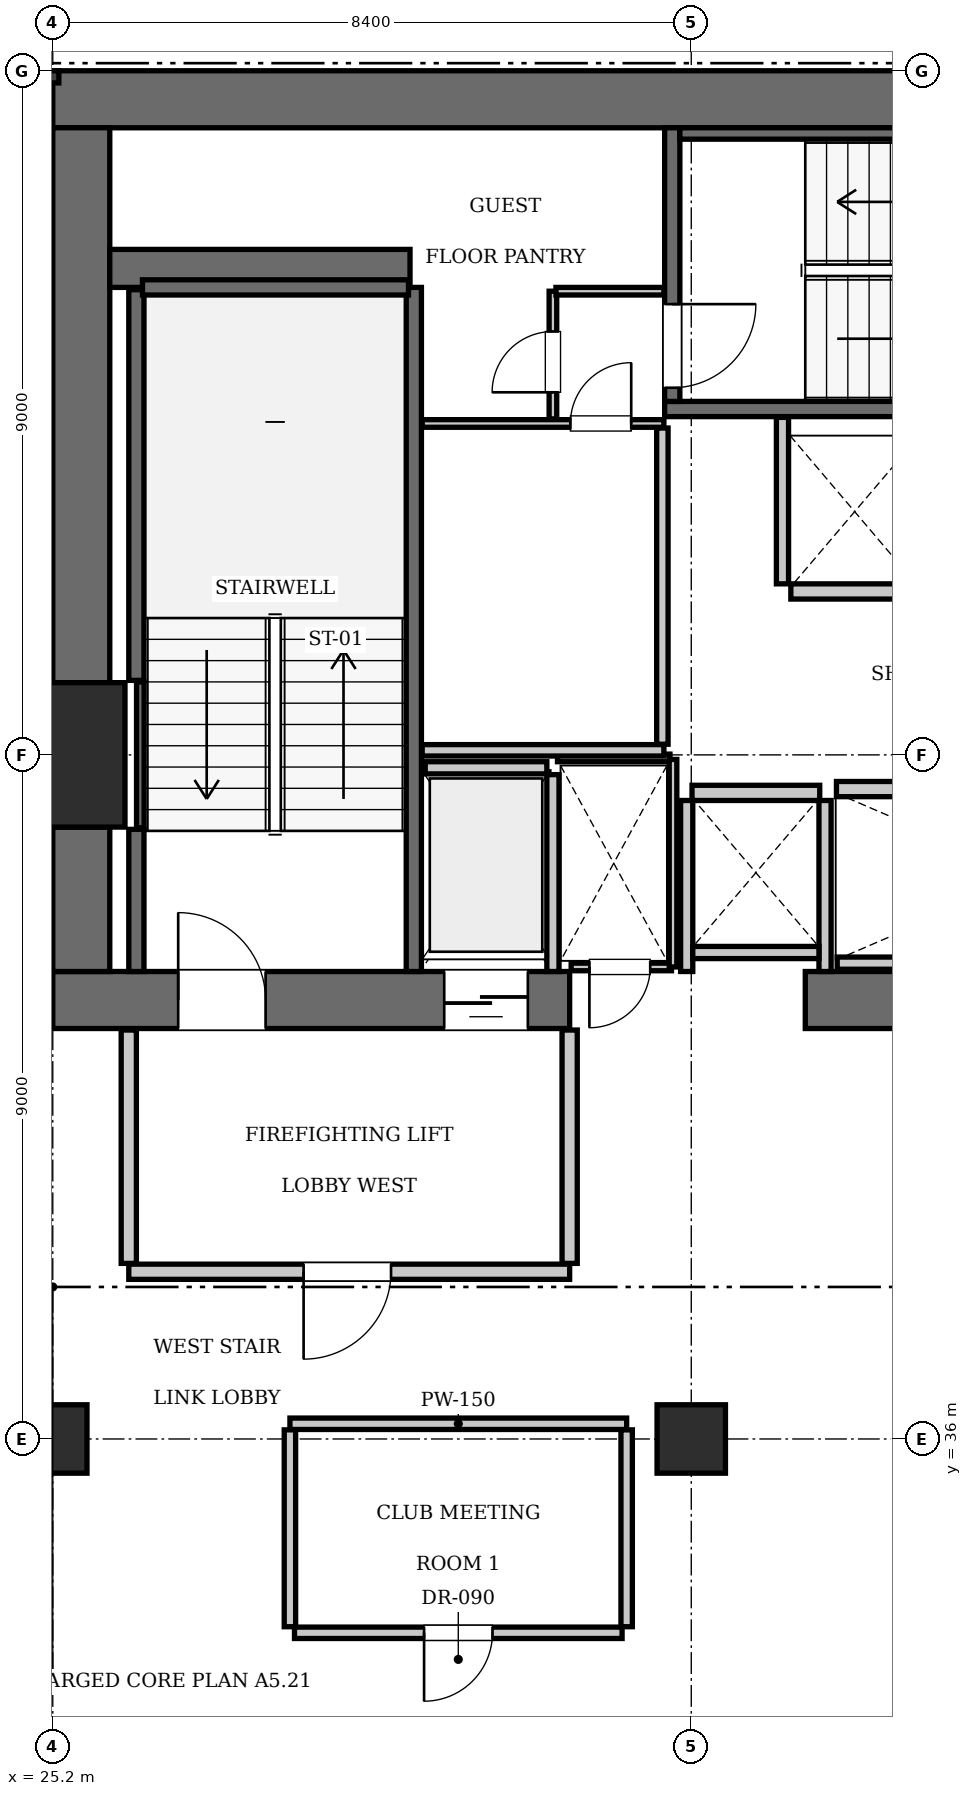
"""IFC4 building model, lengths in metres.
Left out: names, types, materials, properties, quantities, classifications, styles, units other than length and angle.
Written with IfcOpenShell. Run it as: python <this file> out.ifc"""

import sys

from ifc_helpers import new_model, si_unit, direction, frame, frame_2d, origin, origin_2d, place, context, subcontext, project, spatial, rectangle, extrude, element, fill, save


model = new_model("IFC4")
c1 = context("Model", 3, precision=1e-05, world=origin(), true_north=direction((0.0, 1.0)))
c2 = subcontext(c1, "Body", "Model", "MODEL_VIEW")
j1 = project(units=[si_unit("LENGTHUNIT", "METRE"), si_unit("PLANEANGLEUNIT", "RADIAN")], contexts=[c1])
p1 = place(None, origin())
s1 = spatial("IfcSite", under=j1, at=p1, CompositionType="ELEMENT")
p2 = place(p1, origin())
s2 = spatial("IfcBuilding", under=s1, at=p2, CompositionType="ELEMENT")
p3 = place(p2, frame((0.0, 0.0, 142.8)))
s3 = spatial("IfcBuildingStorey", under=s2, at=p3, CompositionType="ELEMENT", Elevation=142.8)
p4 = place(p3, frame((25.2, 45.0, 0.0), z_axis=(0.0, 0.0, 1.0), x_axis=(1.0, 0.0, 0.0)))
e1 = element("IfcColumn", 1, at=p4, inside=s3, PredefinedType="COLUMN", context=c2, shape_type="SweptSolid", body=[
    extrude(rectangle(XDim=1.9, YDim=1.9, at=origin_2d()), origin(), (0.0, 0.0, 1.0), 3.85),
])
p5 = place(p3, frame((25.2, 53.625, 0.0), z_axis=(0.0, 0.0, 1.0), x_axis=(1.0, 0.0, 0.0)))
e2 = element("IfcWall", 2, at=p5, inside=s3, PredefinedType="SHEAR", context=c2, shape_type="SweptSolid", body=[
    extrude(rectangle(XDim=25.2, YDim=0.75, at=frame_2d((12.6, 0.0))), origin(), (0.0, 0.0, 1.0), 3.85),
])
p6 = place(p3, frame((25.2, 41.775, 0.0), z_axis=(0.0, 0.0, 1.0), x_axis=(1.0, 0.0, 0.0)))
e3 = element("IfcWall", 3, at=p6, inside=s3, PredefinedType="SHEAR", context=c2, shape_type="SweptSolid", body=[
    extrude(rectangle(XDim=6.8, YDim=0.75, at=frame_2d((3.4, 0.0))), origin(), (0.0, 0.0, 1.0), 3.85),
])
p7 = place(p6, frame((1.65, 0.0, 0.0)))
e4 = element("IfcOpeningElement", 4, at=p7, cuts=e3, PredefinedType="OPENING", context=c2, shape_type="SweptSolid", body=[
    extrude(rectangle(XDim=1.15, YDim=2.15, at=frame_2d((0.575, 1.075))), frame((0.0, 0.385, 0.0), z_axis=(0.0, -1.0, 0.0), x_axis=(1.0, 0.0, 0.0)), (0.0, 0.0, 1.0), 0.77),
])
p8 = place(p6, frame((5.15, 0.0, 0.0)))
e5 = element("IfcOpeningElement", 5, at=p8, cuts=e3, PredefinedType="OPENING", context=c2, shape_type="SweptSolid", body=[
    extrude(rectangle(XDim=1.1, YDim=2.2, at=frame_2d((0.55, 1.1))), frame((0.0, 0.385, 0.0), z_axis=(0.0, -1.0, 0.0), x_axis=(1.0, 0.0, 0.0)), (0.0, 0.0, 1.0), 0.77),
])
p9 = place(p3, frame((35.1, 41.775, 0.0), z_axis=(0.0, 0.0, 1.0), x_axis=(1.0, 0.0, 0.0)))
e6 = element("IfcWall", 6, at=p9, inside=s3, PredefinedType="SHEAR", context=c2, shape_type="SweptSolid", body=[
    extrude(rectangle(XDim=5.4, YDim=0.75, at=frame_2d((2.7, 0.0))), origin(), (0.0, 0.0, 1.0), 3.85),
])
p10 = place(p3, frame((25.575, 42.15, 0.0), z_axis=(0.0, 0.0, 1.0), x_axis=(0.0, 1.0, 0.0)))
e7 = element("IfcWall", 7, at=p10, inside=s3, PredefinedType="SHEAR", context=c2, shape_type="SweptSolid", body=[
    extrude(rectangle(XDim=1.9, YDim=0.75, at=frame_2d((0.95, 0.0))), origin(), (0.0, 0.0, 1.0), 3.85),
])
p11 = place(p3, frame((25.575, 45.95, 0.0), z_axis=(0.0, 0.0, 1.0), x_axis=(0.0, 1.0, 0.0)))
e8 = element("IfcWall", 8, at=p11, inside=s3, PredefinedType="SHEAR", context=c2, shape_type="SweptSolid", body=[
    extrude(rectangle(XDim=7.3, YDim=0.75, at=frame_2d((3.65, 0.0))), origin(), (0.0, 0.0, 1.0), 3.85),
])
p12 = place(p3, frame((25.95, 51.4, 0.0), z_axis=(0.0, 0.0, 1.0), x_axis=(1.0, 0.0, 0.0)))
e9 = element("IfcWall", 9, at=p12, inside=s3, PredefinedType="SHEAR", context=c2, shape_type="SweptSolid", body=[
    extrude(rectangle(XDim=3.95, YDim=0.5, at=frame_2d((1.975, 0.0))), origin(), (0.0, 0.0, 1.0), 3.85),
])
for number, where, z_axis, x_axis in (
    (10, (25.2, 36.0, 0.0), (0.0, 0.0, 1.0), (1.0, 0.0, 0.0)),
    (11, (33.6, 36.0, 0.0), (0.0, 0.0, 1.0), (1.0, 0.0, 0.0)),
):
    element("IfcColumn", number, at=place(p3, frame(where, z_axis=z_axis, x_axis=x_axis)), inside=s3, PredefinedType="COLUMN", context=c2, shape_type="SweptSolid", body=[
        extrude(rectangle(XDim=0.9, YDim=0.9, at=origin_2d()), origin(), (0.0, 0.0, 1.0), 3.85),
    ])
p13 = place(p3, frame((29.95, 42.15, 0.0), z_axis=(0.0, 0.0, 1.0), x_axis=(0.0, 1.0, 0.0)))
e12 = element("IfcWall", 12, at=p13, inside=s3, PredefinedType="SOLIDWALL", context=c2, shape_type="SweptSolid", body=[
    extrude(rectangle(XDim=9.0, YDim=0.2, at=frame_2d((4.5, 0.0))), origin(), (0.0, 0.0, 1.0), 3.61),
])
p14 = place(p3, frame((26.3, 42.15, 0.0), z_axis=(0.0, 0.0, 1.0), x_axis=(0.0, 1.0, 0.0)))
e13 = element("IfcWall", 13, at=p14, inside=s3, PredefinedType="SOLIDWALL", context=c2, shape_type="SweptSolid", body=[
    extrude(rectangle(XDim=1.87, YDim=0.2, at=frame_2d((0.935, 0.0))), origin(), (0.0, 0.0, 1.0), 3.61),
])
p15 = place(p3, frame((26.3, 45.98, 0.0), z_axis=(0.0, 0.0, 1.0), x_axis=(0.0, 1.0, 0.0)))
e14 = element("IfcWall", 14, at=p15, inside=s3, PredefinedType="SOLIDWALL", context=c2, shape_type="SweptSolid", body=[
    extrude(rectangle(XDim=5.14, YDim=0.2, at=frame_2d((2.57, 0.0))), origin(), (0.0, 0.0, 1.0), 3.61),
])
p16 = place(p3, frame((26.38, 51.15, 0.0), z_axis=(0.0, 0.0, 1.0), x_axis=(1.0, 0.0, 0.0)))
e15 = element("IfcWall", 15, at=p16, inside=s3, PredefinedType="SOLIDWALL", context=c2, shape_type="SweptSolid", body=[
    extrude(rectangle(XDim=3.5, YDim=0.2, at=frame_2d((1.75, 0.0))), origin(), (0.0, 0.0, 1.0), 3.61),
])
p17 = place(p3, frame((26.352, 44.04, 0.0), z_axis=(0.0, 0.0, 1.0), x_axis=(0.0, 1.0, 0.0)))
e16 = element("IfcWall", 16, at=p17, inside=s3, PredefinedType="SOLIDWALL", context=c2, shape_type="SweptSolid", body=[
    extrude(rectangle(XDim=1.92, YDim=0.1, at=frame_2d((0.96, 0.0))), origin(), (0.0, 0.0, 1.0), 3.61),
])
p18 = place(p3, frame((33.25, 49.55, 0.0), z_axis=(0.0, 0.0, 1.0), x_axis=(1.0, 0.0, 0.0)))
e17 = element("IfcWall", 17, at=p18, inside=s3, PredefinedType="SOLIDWALL", context=c2, shape_type="SweptSolid", body=[
    extrude(rectangle(XDim=9.1, YDim=0.2, at=frame_2d((4.55, 0.0))), origin(), (0.0, 0.0, 1.0), 3.61),
])
p19 = place(p3, frame((33.35, 49.65, 0.0), z_axis=(0.0, 0.0, 1.0), x_axis=(0.0, 1.0, 0.0)))
e18 = element("IfcWall", 18, at=p19, inside=s3, PredefinedType="SOLIDWALL", context=c2, shape_type="SweptSolid", body=[
    extrude(rectangle(XDim=3.6, YDim=0.2, at=frame_2d((1.8, 0.0))), origin(), (0.0, 0.0, 1.0), 3.61),
])
p20 = place(p19, frame((0.18, 0.0, 0.0)))
e19 = element("IfcOpeningElement", 19, at=p20, cuts=e18, PredefinedType="OPENING", context=c2, shape_type="SweptSolid", body=[
    extrude(rectangle(XDim=1.1, YDim=2.15, at=frame_2d((0.55, 1.075))), frame((0.0, 0.11, 0.0), z_axis=(0.0, -1.0, 0.0), x_axis=(1.0, 0.0, 0.0)), (0.0, 0.0, 1.0), 0.22),
])
p21 = place(p3, frame((33.45, 53.175, 0.0), z_axis=(0.0, 0.0, 1.0), x_axis=(1.0, 0.0, 0.0)))
e20 = element("IfcWall", 20, at=p21, inside=s3, PredefinedType="SOLIDWALL", context=c2, shape_type="SweptSolid", body=[
    extrude(rectangle(XDim=8.7, YDim=0.15, at=frame_2d((4.35, 0.0))), origin(), (0.0, 0.0, 1.0), 3.61),
])
p22 = place(p3, frame((35.51, 44.55, 0.0), z_axis=(0.0, 0.0, 1.0), x_axis=(1.0, 0.0, 0.0)))
e21 = element("IfcWall", 21, at=p22, inside=s3, PredefinedType="SOLIDWALL", context=c2, shape_type="SweptSolid", body=[
    extrude(rectangle(XDim=1.68, YDim=0.2, at=frame_2d((0.84, 0.0))), origin(), (0.0, 0.0, 1.0), 3.61),
])
p23 = place(p3, frame((34.91, 47.15, 0.0), z_axis=(0.0, 0.0, 1.0), x_axis=(1.0, 0.0, 0.0)))
e22 = element("IfcWall", 22, at=p23, inside=s3, PredefinedType="SOLIDWALL", context=c2, shape_type="SweptSolid", body=[
    extrude(rectangle(XDim=1.68, YDim=0.2, at=frame_2d((0.84, 0.0))), origin(), (0.0, 0.0, 1.0), 3.61),
])
p24 = place(p3, frame((33.61, 44.5, 0.0), z_axis=(0.0, 0.0, 1.0), x_axis=(1.0, 0.0, 0.0)))
e23 = element("IfcWall", 23, at=p24, inside=s3, PredefinedType="SOLIDWALL", context=c2, shape_type="SweptSolid", body=[
    extrude(rectangle(XDim=1.68, YDim=0.2, at=frame_2d((0.84, 0.0))), origin(), (0.0, 0.0, 1.0), 3.61),
])
p25 = place(p3, frame((30.1, 44.83, 0.0), z_axis=(0.0, 0.0, 1.0), x_axis=(1.0, 0.0, 0.0)))
e24 = element("IfcWall", 24, at=p25, inside=s3, PredefinedType="SOLIDWALL", context=c2, shape_type="SweptSolid", body=[
    extrude(rectangle(XDim=1.6, YDim=0.16, at=frame_2d((0.8, 0.0))), origin(), (0.0, 0.0, 1.0), 3.61),
])
p26 = place(p3, frame((31.78, 42.15, 0.0), z_axis=(0.0, 0.0, 1.0), x_axis=(0.0, 1.0, 0.0)))
e25 = element("IfcWall", 25, at=p26, inside=s3, PredefinedType="SOLIDWALL", context=c2, shape_type="SweptSolid", body=[
    extrude(rectangle(XDim=2.59, YDim=0.16, at=frame_2d((1.295, 0.0))), origin(), (0.0, 0.0, 1.0), 3.61),
])
p27 = place(p3, frame((35.52, 42.26, 0.0), z_axis=(0.0, 0.0, 1.0), x_axis=(1.0, 0.0, 0.0)))
e26 = element("IfcWall", 26, at=p27, inside=s3, PredefinedType="SOLIDWALL", context=c2, shape_type="SweptSolid", body=[
    extrude(rectangle(XDim=5.02, YDim=0.16, at=frame_2d((2.51, 0.0))), origin(), (0.0, 0.0, 1.0), 3.61),
])
p28 = place(p3, frame((34.8, 47.25, 0.0), z_axis=(0.0, 0.0, 1.0), x_axis=(0.0, 1.0, 0.0)))
e27 = element("IfcWall", 27, at=p28, inside=s3, PredefinedType="SOLIDWALL", context=c2, shape_type="SweptSolid", body=[
    extrude(rectangle(XDim=2.19, YDim=0.16, at=frame_2d((1.095, 0.0))), origin(), (0.0, 0.0, 1.0), 3.61),
])
for number, where, z_axis, x_axis in (
    (28, (33.54, 42.15, 0.0), (0.0, 0.0, 1.0), (0.0, 1.0, 0.0)),
    (29, (35.36, 42.15, 0.0), (0.0, 0.0, 1.0), (0.0, 1.0, 0.0)),
):
    element("IfcWall", number, at=place(p3, frame(where, z_axis=z_axis, x_axis=x_axis)), inside=s3, PredefinedType="SOLIDWALL", context=c2, shape_type="SweptSolid", body=[
        extrude(rectangle(XDim=2.25, YDim=0.16, at=frame_2d((1.125, 0.0))), origin(), (0.0, 0.0, 1.0), 3.61),
    ])
p29 = place(p3, frame((33.62, 42.4, 0.0), z_axis=(0.0, 0.0, 1.0), x_axis=(1.0, 0.0, 0.0)))
e30 = element("IfcWall", 30, at=p29, inside=s3, PredefinedType="SOLIDWALL", context=c2, shape_type="SweptSolid", body=[
    extrude(rectangle(XDim=1.66, YDim=0.16, at=frame_2d((0.83, 0.0))), origin(), (0.0, 0.0, 1.0), 3.61),
])
p30 = place(p3, frame((26.2, 38.2, 0.0), z_axis=(0.0, 0.0, 1.0), x_axis=(1.0, 0.0, 0.0)))
e31 = element("IfcWall", 31, at=p30, inside=s3, PredefinedType="PARTITIONING", context=c2, shape_type="SweptSolid", body=[
    extrude(rectangle(XDim=5.8, YDim=0.2, at=frame_2d((2.9, 0.0))), origin(), (0.0, 0.0, 1.0), 3.61),
])
p31 = place(p30, frame((2.3, 0.0, 0.0)))
e32 = element("IfcOpeningElement", 32, at=p31, cuts=e31, PredefinedType="OPENING", context=c2, shape_type="SweptSolid", body=[
    extrude(rectangle(XDim=1.15, YDim=2.15, at=frame_2d((0.575, 1.075))), frame((0.0, 0.11, 0.0), z_axis=(0.0, -1.0, 0.0), x_axis=(1.0, 0.0, 0.0)), (0.0, 0.0, 1.0), 0.22),
])
for number, where, z_axis, x_axis in (
    (33, (26.2, 38.31, 0.0), (0.0, 0.0, 1.0), (0.0, 1.0, 0.0)),
    (34, (32.0, 38.31, 0.0), (0.0, 0.0, 1.0), (0.0, 1.0, 0.0)),
):
    element("IfcWall", number, at=place(p3, frame(where, z_axis=z_axis, x_axis=x_axis)), inside=s3, PredefinedType="PARTITIONING", context=c2, shape_type="SweptSolid", body=[
        extrude(rectangle(XDim=3.07, YDim=0.2, at=frame_2d((1.535, 0.0))), origin(), (0.0, 0.0, 1.0), 3.61),
    ])
p32 = place(p3, frame((32.02, 42.21, 0.0), z_axis=(0.0, 0.0, 1.0), x_axis=(1.0, 0.0, 0.0)))
e35 = element("IfcWall", 35, at=p32, inside=s3, PredefinedType="PARTITIONING", context=c2, shape_type="SweptSolid", body=[
    extrude(rectangle(XDim=1.32, YDim=0.1, at=frame_2d((0.66, 0.0))), origin(), (0.0, 0.0, 1.0), 3.61),
])
p33 = place(p32, frame((0.24, 0.0, 0.0)))
e36 = element("IfcOpeningElement", 36, at=p33, cuts=e35, PredefinedType="OPENING", context=c2, shape_type="SweptSolid", body=[
    extrude(rectangle(XDim=0.8, YDim=2.05, at=frame_2d((0.4, 1.025))), frame((0.0, 0.06, 0.0), z_axis=(0.0, -1.0, 0.0), x_axis=(1.0, 0.0, 0.0)), (0.0, 0.0, 1.0), 0.12),
])
p34 = place(p3, frame((31.84, 44.96, 0.0), z_axis=(0.0, 0.0, 1.0), x_axis=(1.0, 0.0, 0.0)))
e37 = element("IfcWall", 37, at=p34, inside=s3, PredefinedType="PARTITIONING", context=c2, shape_type="SweptSolid", body=[
    extrude(rectangle(XDim=1.48, YDim=0.1, at=frame_2d((0.74, 0.0))), origin(), (0.0, 0.0, 1.0), 3.61),
])
p35 = place(p3, frame((33.36, 42.21, 0.0), z_axis=(0.0, 0.0, 1.0), x_axis=(0.0, 1.0, 0.0)))
e38 = element("IfcWall", 38, at=p35, inside=s3, PredefinedType="PARTITIONING", context=c2, shape_type="SweptSolid", body=[
    extrude(rectangle(XDim=2.73, YDim=0.1, at=frame_2d((1.365, 0.0))), origin(), (0.0, 0.0, 1.0), 3.61),
])
p36 = place(p3, frame((30.06, 45.06, 0.0), z_axis=(0.0, 0.0, 1.0), x_axis=(1.0, 0.0, 0.0)))
e39 = element("IfcWall", 39, at=p36, inside=s3, PredefinedType="PARTITIONING", context=c2, shape_type="SweptSolid", body=[
    extrude(rectangle(XDim=3.18, YDim=0.15, at=frame_2d((1.59, 0.0))), origin(), (0.0, 0.0, 1.0), 3.61),
])
p37 = place(p3, frame((33.22, 45.14, 0.0), z_axis=(0.0, 0.0, 1.0), x_axis=(0.0, 1.0, 0.0)))
e40 = element("IfcWall", 40, at=p37, inside=s3, PredefinedType="PARTITIONING", context=c2, shape_type="SweptSolid", body=[
    extrude(rectangle(XDim=4.16, YDim=0.15, at=frame_2d((2.08, 0.0))), origin(), (0.0, 0.0, 1.0), 3.61),
])
p38 = place(p3, frame((30.06, 49.36, 0.0), z_axis=(0.0, 0.0, 1.0), x_axis=(1.0, 0.0, 0.0)))
e41 = element("IfcWall", 41, at=p38, inside=s3, PredefinedType="PARTITIONING", context=c2, shape_type="SweptSolid", body=[
    extrude(rectangle(XDim=3.18, YDim=0.1, at=frame_2d((1.59, 0.0))), origin(), (0.0, 0.0, 1.0), 3.61),
])
p39 = place(p38, frame((1.95, 0.0, 0.0)))
e42 = element("IfcOpeningElement", 42, at=p39, cuts=e41, PredefinedType="OPENING", context=c2, shape_type="SweptSolid", body=[
    extrude(rectangle(XDim=0.8, YDim=2.05, at=frame_2d((0.4, 1.025))), frame((0.0, 0.06, 0.0), z_axis=(0.0, -1.0, 0.0), x_axis=(1.0, 0.0, 0.0)), (0.0, 0.0, 1.0), 0.12),
])
p40 = place(p3, frame((31.78, 49.42, 0.0), z_axis=(0.0, 0.0, 1.0), x_axis=(0.0, 1.0, 0.0)))
e43 = element("IfcWall", 43, at=p40, inside=s3, PredefinedType="PARTITIONING", context=c2, shape_type="SweptSolid", body=[
    extrude(rectangle(XDim=1.68, YDim=0.1, at=frame_2d((0.84, 0.0))), origin(), (0.0, 0.0, 1.0), 3.61),
])
p41 = place(p40, frame((0.35, 0.0, 0.0)))
e44 = element("IfcOpeningElement", 44, at=p41, cuts=e43, PredefinedType="OPENING", context=c2, shape_type="SweptSolid", body=[
    extrude(rectangle(XDim=0.8, YDim=2.05, at=frame_2d((0.4, 1.025))), frame((0.0, 0.06, 0.0), z_axis=(0.0, -1.0, 0.0), x_axis=(1.0, 0.0, 0.0)), (0.0, 0.0, 1.0), 0.12),
])
p42 = place(p3, frame((31.82, 51.1, 0.0), z_axis=(0.0, 0.0, 1.0), x_axis=(1.0, 0.0, 0.0)))
e45 = element("IfcWall", 45, at=p42, inside=s3, PredefinedType="PARTITIONING", context=c2, shape_type="SweptSolid", body=[
    extrude(rectangle(XDim=1.42, YDim=0.1, at=frame_2d((0.71, 0.0))), origin(), (0.0, 0.0, 1.0), 3.61),
])
p43 = place(p3, frame((28.32, 36.2, 0.0), z_axis=(0.0, 0.0, 1.0), x_axis=(1.0, 0.0, 0.0)))
e46 = element("IfcWall", 46, at=p43, inside=s3, PredefinedType="PARTITIONING", context=c2, shape_type="SweptSolid", body=[
    extrude(rectangle(XDim=4.43, YDim=0.15, at=frame_2d((2.215, 0.0))), origin(), (0.0, 0.0, 1.0), 3.61),
])
for number, where, z_axis, x_axis in (
    (47, (28.32, 33.53, 0.0), (0.0, 0.0, 1.0), (0.0, 1.0, 0.0)),
    (48, (32.75, 33.53, 0.0), (0.0, 0.0, 1.0), (0.0, 1.0, 0.0)),
):
    element("IfcWall", number, at=place(p3, frame(where, z_axis=z_axis, x_axis=x_axis)), inside=s3, PredefinedType="PARTITIONING", context=c2, shape_type="SweptSolid", body=[
        extrude(rectangle(XDim=2.59, YDim=0.15, at=frame_2d((1.295, 0.0))), origin(), (0.0, 0.0, 1.0), 3.61),
    ])
p44 = place(p3, frame((28.38, 33.45, 0.0), z_axis=(0.0, 0.0, 1.0), x_axis=(1.0, 0.0, 0.0)))
e49 = element("IfcWall", 49, at=p44, inside=s3, PredefinedType="PARTITIONING", context=c2, shape_type="SweptSolid", body=[
    extrude(rectangle(XDim=4.31, YDim=0.15, at=frame_2d((2.155, 0.0))), origin(), (0.0, 0.0, 1.0), 3.61),
])
p45 = place(p44, frame((1.705, 0.0, 0.0)))
e50 = element("IfcOpeningElement", 50, at=p45, cuts=e49, PredefinedType="OPENING", context=c2, shape_type="SweptSolid", body=[
    extrude(rectangle(XDim=0.9, YDim=2.1, at=frame_2d((0.45, 1.05))), frame((0.0, 0.085, 0.0), z_axis=(0.0, -1.0, 0.0), x_axis=(1.0, 0.0, 0.0)), (0.0, 0.0, 1.0), 0.17),
])
p46 = place(p7, origin())
e51 = element("IfcDoor", 51, at=p46, inside=s3, OperationType="SINGLE_SWING_LEFT", PredefinedType="DOOR", context=c2, shape_type="SweptSolid", body=[
    extrude(rectangle(XDim=1.15, YDim=2.15, at=frame_2d((0.575, 1.075))), frame((0.0, 0.025, 0.0), z_axis=(0.0, -1.0, 0.0), x_axis=(1.0, 0.0, 0.0)), (0.0, 0.0, 1.0), 0.05),
])
fill(e4, e51)
p47 = place(p20, frame((1.1, 0.0, 0.0), z_axis=(0.0, 0.0, 1.0), x_axis=(-1.0, 0.0, 0.0)))
e52 = element("IfcDoor", 52, at=p47, inside=s3, OperationType="SINGLE_SWING_LEFT", PredefinedType="DOOR", context=c2, shape_type="SweptSolid", body=[
    extrude(rectangle(XDim=1.1, YDim=2.15, at=frame_2d((0.55, 1.075))), frame((0.0, 0.025, 0.0), z_axis=(0.0, -1.0, 0.0), x_axis=(1.0, 0.0, 0.0)), (0.0, 0.0, 1.0), 0.05),
])
fill(e19, e52)
p48 = place(p8, frame((1.1, 0.0, 0.0), z_axis=(0.0, 0.0, 1.0), x_axis=(-1.0, 0.0, 0.0)))
e53 = element("IfcDoor", 53, at=p48, inside=s3, OperationType="SLIDING_TO_LEFT", PredefinedType="DOOR", context=c2, shape_type="SweptSolid", body=[
    extrude(rectangle(XDim=1.1, YDim=2.2, at=frame_2d((0.55, 1.1))), frame((0.0, 0.025, 0.0), z_axis=(0.0, -1.0, 0.0), x_axis=(1.0, 0.0, 0.0)), (0.0, 0.0, 1.0), 0.05),
])
fill(e5, e53)
p49 = place(p31, frame((1.15, 0.0, 0.0), z_axis=(0.0, 0.0, 1.0), x_axis=(-1.0, 0.0, 0.0)))
e54 = element("IfcDoor", 54, at=p49, inside=s3, OperationType="SINGLE_SWING_RIGHT", PredefinedType="DOOR", context=c2, shape_type="SweptSolid", body=[
    extrude(rectangle(XDim=1.15, YDim=2.15, at=frame_2d((0.575, 1.075))), frame((0.0, 0.025, 0.0), z_axis=(0.0, -1.0, 0.0), x_axis=(1.0, 0.0, 0.0)), (0.0, 0.0, 1.0), 0.05),
])
fill(e32, e54)
p50 = place(p33, frame((0.8, 0.0, 0.0), z_axis=(0.0, 0.0, 1.0), x_axis=(-1.0, 0.0, 0.0)))
e55 = element("IfcDoor", 55, at=p50, inside=s3, OperationType="SINGLE_SWING_RIGHT", PredefinedType="DOOR", context=c2, shape_type="SweptSolid", body=[
    extrude(rectangle(XDim=0.8, YDim=2.05, at=frame_2d((0.4, 1.025))), frame((0.0, 0.025, 0.0), z_axis=(0.0, -1.0, 0.0), x_axis=(1.0, 0.0, 0.0)), (0.0, 0.0, 1.0), 0.05),
])
fill(e36, e55)
p51 = place(p39, origin())
e56 = element("IfcDoor", 56, at=p51, inside=s3, OperationType="SINGLE_SWING_RIGHT", PredefinedType="DOOR", context=c2, shape_type="SweptSolid", body=[
    extrude(rectangle(XDim=0.8, YDim=2.05, at=frame_2d((0.4, 1.025))), frame((0.0, 0.025, 0.0), z_axis=(0.0, -1.0, 0.0), x_axis=(1.0, 0.0, 0.0)), (0.0, 0.0, 1.0), 0.05),
])
fill(e42, e56)
p52 = place(p41, origin())
e57 = element("IfcDoor", 57, at=p52, inside=s3, OperationType="SINGLE_SWING_LEFT", PredefinedType="DOOR", context=c2, shape_type="SweptSolid", body=[
    extrude(rectangle(XDim=0.8, YDim=2.05, at=frame_2d((0.4, 1.025))), frame((0.0, 0.025, 0.0), z_axis=(0.0, -1.0, 0.0), x_axis=(1.0, 0.0, 0.0)), (0.0, 0.0, 1.0), 0.05),
])
fill(e44, e57)
p53 = place(p45, frame((0.9, 0.0, 0.0), z_axis=(0.0, 0.0, 1.0), x_axis=(-1.0, 0.0, 0.0)))
e58 = element("IfcDoor", 58, at=p53, inside=s3, OperationType="SINGLE_SWING_RIGHT", PredefinedType="DOOR", context=c2, shape_type="SweptSolid", body=[
    extrude(rectangle(XDim=0.9, YDim=2.1, at=frame_2d((0.45, 1.05))), frame((0.0, 0.025, 0.0), z_axis=(0.0, -1.0, 0.0), x_axis=(1.0, 0.0, 0.0)), (0.0, 0.0, 1.0), 0.05),
])
fill(e50, e58)
save(model, sys.argv[1])
